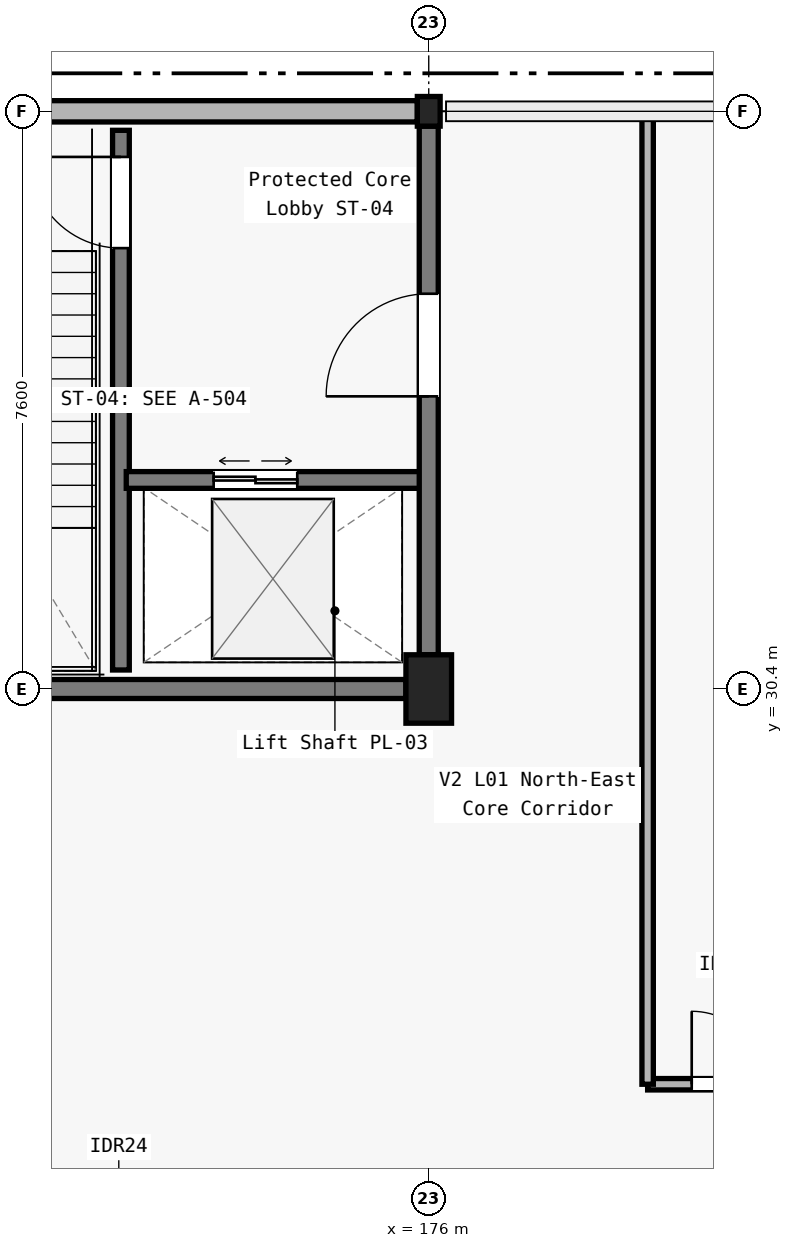
"""IFC4 building model, lengths in metres.
Left out: names, types, materials, properties, quantities, classifications, styles, units other than length and angle.
Written with IfcOpenShell. Run it as: python <this file> out.ifc"""

import sys

from ifc_helpers import new_model, si_unit, direction, frame, frame_2d, origin, origin_2d, place, context, subcontext, project, spatial, rectangle, i_section, extrude, element, fill, save


model = new_model("IFC4")
c1 = context("Model", 3, precision=1e-05, world=origin(), true_north=direction((0.0, 1.0)))
c2 = subcontext(c1, "Body", "Model", "MODEL_VIEW")
j1 = project(units=[si_unit("LENGTHUNIT", "METRE"), si_unit("PLANEANGLEUNIT", "RADIAN")], contexts=[c1])
p1 = place(None, origin())
s1 = spatial("IfcSite", under=j1, at=p1, CompositionType="ELEMENT")
p2 = place(p1, origin())
s2 = spatial("IfcBuilding", under=s1, at=p2, CompositionType="ELEMENT")
p3 = place(p2, frame((0.0, 0.0, 5.4)))
s3 = spatial("IfcBuildingStorey", under=s2, at=p3, CompositionType="ELEMENT", Elevation=5.4)
p4 = place(p3, frame((176.0, 30.4, 0.0), z_axis=(0.0, 0.0, 1.0), x_axis=(1.0, 0.0, 0.0)))
e1 = element("IfcColumn", 1, at=p4, inside=s3, PredefinedType="COLUMN", context=c2, shape_type="SweptSolid", body=[
    extrude(rectangle(XDim=0.6, YDim=0.9, at=origin_2d()), origin(), (0.0, 0.0, 1.0), 4.8),
])
p5 = place(p3, frame((176.0, 38.0, 0.0), z_axis=(0.0, 0.0, 1.0), x_axis=(1.0, 0.0, 0.0)))
e2 = element("IfcColumn", 2, at=p5, inside=s3, PredefinedType="COLUMN", context=c2, shape_type="SweptSolid", body=[
    extrude(i_section(OverallWidth=0.3, OverallDepth=0.39, WebThickness=0.011, FlangeThickness=0.019, FilletRadius=0.027, at=origin_2d()), origin(), (0.0, 0.0, 1.0), 4.8),
])
p6 = place(p3, frame((168.15, 38.0, 0.0), z_axis=(0.0, 0.0, 1.0), x_axis=(1.0, 0.0, 0.0)))
e3 = element("IfcWall", 3, at=p6, inside=s3, PredefinedType="SOLIDWALL", context=c2, shape_type="SweptSolid", body=[
    extrude(rectangle(XDim=7.7, YDim=0.28, at=frame_2d((3.85, 0.0))), origin(), (0.0, 0.0, 1.0), 3.85),
])
p7 = place(p3, frame((168.35, 30.4, 0.0), z_axis=(0.0, 0.0, 1.0), x_axis=(1.0, 0.0, 0.0)))
e4 = element("IfcWall", 4, at=p7, inside=s3, PredefinedType="SOLIDWALL", context=c2, shape_type="SweptSolid", body=[
    extrude(rectangle(XDim=7.35, YDim=0.25, at=frame_2d((3.675, 0.0))), origin(), (0.0, 0.0, 1.0), 3.65),
])
p8 = place(p3, frame((171.95, 30.65, 0.0), z_axis=(0.0, 0.0, 1.0), x_axis=(0.0, 1.0, 0.0)))
e5 = element("IfcWall", 5, at=p8, inside=s3, PredefinedType="SOLIDWALL", context=c2, shape_type="SweptSolid", body=[
    extrude(rectangle(XDim=7.1, YDim=0.22, at=frame_2d((3.55, 0.0))), origin(), (0.0, 0.0, 1.0), 4.51),
])
p9 = place(p8, frame((5.55, 0.0, 0.0)))
e6 = element("IfcOpeningElement", 6, at=p9, cuts=e5, PredefinedType="OPENING", context=c2, shape_type="SweptSolid", body=[
    extrude(rectangle(XDim=1.2, YDim=2.15, at=frame_2d((0.6, 1.075))), frame((0.0, 0.12, 0.0), z_axis=(0.0, -1.0, 0.0), x_axis=(1.0, 0.0, 0.0)), (0.0, 0.0, 1.0), 0.24),
])
p10 = place(p3, frame((172.02, 33.15, 0.0), z_axis=(0.0, 0.0, 1.0), x_axis=(1.0, 0.0, 0.0)))
e7 = element("IfcWall", 7, at=p10, inside=s3, PredefinedType="SOLIDWALL", context=c2, shape_type="SweptSolid", body=[
    extrude(rectangle(XDim=3.93, YDim=0.22, at=frame_2d((1.965, 0.0))), origin(), (0.0, 0.0, 1.0), 3.81),
])
p11 = place(p10, frame((1.15, 0.0, 0.0)))
e8 = element("IfcOpeningElement", 8, at=p11, cuts=e7, PredefinedType="OPENING", context=c2, shape_type="SweptSolid", body=[
    extrude(rectangle(XDim=1.1, YDim=2.2, at=frame_2d((0.55, 1.1))), frame((0.0, 0.12, 0.0), z_axis=(0.0, -1.0, 0.0), x_axis=(1.0, 0.0, 0.0)), (0.0, 0.0, 1.0), 0.24),
])
p12 = place(p3, frame((176.0, 30.85, 0.0), z_axis=(0.0, 0.0, 1.0), x_axis=(0.0, 1.0, 0.0)))
e9 = element("IfcWall", 9, at=p12, inside=s3, PredefinedType="SOLIDWALL", context=c2, shape_type="SweptSolid", body=[
    extrude(rectangle(XDim=6.955, YDim=0.25, at=frame_2d((3.478, 0.0))), origin(), (0.0, 0.0, 1.0), 3.81),
])
p13 = place(p12, frame((3.4, 0.0, 0.0)))
e10 = element("IfcOpeningElement", 10, at=p13, cuts=e9, PredefinedType="OPENING", context=c2, shape_type="SweptSolid", body=[
    extrude(rectangle(XDim=1.35, YDim=2.2, at=frame_2d((0.675, 1.1))), frame((0.0, 0.135, 0.0), z_axis=(0.0, -1.0, 0.0), x_axis=(1.0, 0.0, 0.0)), (0.0, 0.0, 1.0), 0.27),
])
p14 = place(p3, frame((178.88, 25.2, 0.0), z_axis=(0.0, 0.0, 1.0), x_axis=(1.0, 0.0, 0.0)))
e11 = element("IfcWall", 11, at=p14, inside=s3, PredefinedType="PARTITIONING", context=c2, shape_type="SweptSolid", body=[
    extrude(rectangle(XDim=5.04, YDim=0.15, at=frame_2d((2.52, 0.0))), origin(), (0.0, 0.0, 1.0), 3.88),
])
p15 = place(p14, frame((0.58, 0.0, 0.0)))
e12 = element("IfcOpeningElement", 12, at=p15, cuts=e11, PredefinedType="OPENING", context=c2, shape_type="SweptSolid", body=[
    extrude(rectangle(XDim=0.96, YDim=2.05, at=frame_2d((0.48, 1.025))), frame((0.0, 0.085, 0.0), z_axis=(0.0, -1.0, 0.0), x_axis=(1.0, 0.0, 0.0)), (0.0, 0.0, 1.0), 0.17),
])
p16 = place(p3, frame((178.88, 25.2, 0.0), z_axis=(0.0, 0.0, 1.0), x_axis=(0.0, 1.0, 0.0)))
e13 = element("IfcWall", 13, at=p16, inside=s3, PredefinedType="PARTITIONING", context=c2, shape_type="SweptSolid", body=[
    extrude(rectangle(XDim=12.72, YDim=0.15, at=frame_2d((6.36, 0.0))), origin(), (0.0, 0.0, 1.0), 3.635),
])
p17 = place(p9, origin())
e14 = element("IfcDoor", 14, at=p17, inside=s3, OperationType="SINGLE_SWING_RIGHT", PredefinedType="DOOR", context=c2, shape_type="SweptSolid", body=[
    extrude(rectangle(XDim=1.2, YDim=2.15, at=frame_2d((0.6, 1.075))), frame((0.0, 0.025, 0.0), z_axis=(0.0, -1.0, 0.0), x_axis=(1.0, 0.0, 0.0)), (0.0, 0.0, 1.0), 0.05),
])
fill(e6, e14)
p18 = place(p11, origin())
e15 = element("IfcDoor", 15, at=p18, inside=s3, OperationType="DOUBLE_DOOR_SLIDING", PredefinedType="DOOR", context=c2, shape_type="SweptSolid", body=[
    extrude(rectangle(XDim=1.1, YDim=2.2, at=frame_2d((0.55, 1.1))), frame((0.0, 0.025, 0.0), z_axis=(0.0, -1.0, 0.0), x_axis=(1.0, 0.0, 0.0)), (0.0, 0.0, 1.0), 0.05),
])
fill(e8, e15)
p19 = place(p13, origin())
e16 = element("IfcDoor", 16, at=p19, inside=s3, OperationType="SINGLE_SWING_LEFT", PredefinedType="DOOR", context=c2, shape_type="SweptSolid", body=[
    extrude(rectangle(XDim=1.35, YDim=2.2, at=frame_2d((0.675, 1.1))), frame((0.0, 0.025, 0.0), z_axis=(0.0, -1.0, 0.0), x_axis=(1.0, 0.0, 0.0)), (0.0, 0.0, 1.0), 0.05),
])
fill(e10, e16)
p20 = place(p15, origin())
e17 = element("IfcDoor", 17, at=p20, inside=s3, OperationType="SINGLE_SWING_LEFT", PredefinedType="DOOR", context=c2, shape_type="SweptSolid", body=[
    extrude(rectangle(XDim=0.96, YDim=2.05, at=frame_2d((0.48, 1.025))), frame((0.0, 0.025, 0.0), z_axis=(0.0, -1.0, 0.0), x_axis=(1.0, 0.0, 0.0)), (0.0, 0.0, 1.0), 0.05),
])
fill(e12, e17)
save(model, sys.argv[1])
